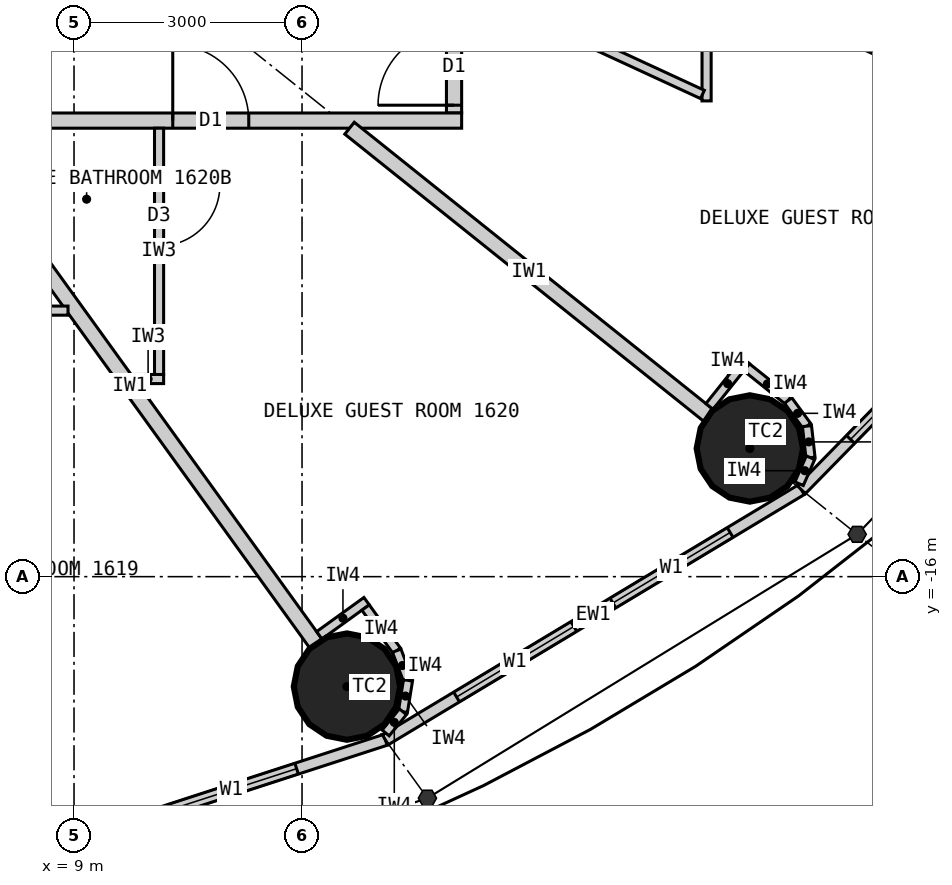
"""IFC4 building model, lengths in metres.
Left out: names, types, materials, properties, quantities, classifications, styles, units other than length and angle.
Written with IfcOpenShell. Run it as: python <this file> out.ifc"""

import sys

from ifc_helpers import new_model, si_unit, direction, frame, frame_2d, origin, origin_2d, place, context, subcontext, project, spatial, rectangle, circle, extrude, element, fill, save


model = new_model("IFC4")
c1 = context("Model", 3, precision=1e-05, world=origin(), true_north=direction((0.0, 1.0)))
c2 = subcontext(c1, "Body", "Model", "MODEL_VIEW")
j1 = project(units=[si_unit("LENGTHUNIT", "METRE"), si_unit("PLANEANGLEUNIT", "RADIAN")], contexts=[c1])
p1 = place(None, origin())
s1 = spatial("IfcSite", under=j1, at=p1, CompositionType="ELEMENT")
p2 = place(p1, origin())
s2 = spatial("IfcBuilding", under=s1, at=p2, CompositionType="ELEMENT")
p3 = place(p2, frame((0.0, 0.0, 67.2)))
s3 = spatial("IfcBuildingStorey", under=s2, at=p3, CompositionType="ELEMENT", Elevation=67.2)
for number, where, z_axis, x_axis in (
    (1, (12.591, -17.447, 0.0), (0.0, 0.0, 1.0), (1.0, 0.0, 0.0)),
    (2, (17.892, -14.313, 0.0), (0.0, 0.0, 1.0), (1.0, 0.0, 0.0)),
):
    element("IfcColumn", number, at=place(p3, frame(where, z_axis=z_axis, x_axis=x_axis)), inside=s3, PredefinedType="COLUMN", context=c2, shape_type="SweptSolid", body=[
        extrude(circle(Radius=0.7, at=origin_2d()), origin(), (0.0, 0.0, 1.0), 3.3),
    ])
p4 = place(p3, frame((6.766, -20.202, 0.0), z_axis=(0.0, 0.0, 1.0), x_axis=(0.951137534625, 0.308767534285, 0.0)))
e3 = element("IfcWall", 3, at=p4, inside=s3, PredefinedType="ELEMENTEDWALL", context=c2, shape_type="SweptSolid", body=[
    extrude(rectangle(XDim=6.655, YDim=0.15, at=frame_2d((3.328, 0.0))), origin(), (0.0, 0.0, 1.0), 3.12),
])
p5 = place(p4, frame((1.228, 0.0, 0.9)))
e4 = element("IfcOpeningElement", 4, at=p5, cuts=e3, PredefinedType="OPENING", context=c2, shape_type="SweptSolid", body=[
    extrude(rectangle(XDim=1.8, YDim=1.9, at=frame_2d((0.9, 0.95))), frame((0.0, 0.085, 0.0), z_axis=(0.0, -1.0, 0.0), x_axis=(1.0, 0.0, 0.0)), (0.0, 0.0, 1.0), 0.17),
])
p6 = place(p4, frame((3.628, 0.0, 0.9)))
e5 = element("IfcOpeningElement", 5, at=p6, cuts=e3, PredefinedType="OPENING", context=c2, shape_type="SweptSolid", body=[
    extrude(rectangle(XDim=1.8, YDim=1.9, at=frame_2d((0.9, 0.95))), frame((0.0, 0.085, 0.0), z_axis=(0.0, -1.0, 0.0), x_axis=(1.0, 0.0, 0.0)), (0.0, 0.0, 1.0), 0.17),
])
p7 = place(p3, frame((13.096, -18.147, 0.0), z_axis=(0.0, 0.0, 1.0), x_axis=(0.856983180864, 0.515344377787, 0.0)))
e6 = element("IfcWall", 6, at=p7, inside=s3, PredefinedType="ELEMENTEDWALL", context=c2, shape_type="SweptSolid", body=[
    extrude(rectangle(XDim=6.386, YDim=0.15, at=frame_2d((3.193, 0.0))), origin(), (0.0, 0.0, 1.0), 3.12),
])
p8 = place(p7, frame((1.093, 0.0, 0.9)))
e7 = element("IfcOpeningElement", 7, at=p8, cuts=e6, PredefinedType="OPENING", context=c2, shape_type="SweptSolid", body=[
    extrude(rectangle(XDim=1.8, YDim=1.9, at=frame_2d((0.9, 0.95))), frame((0.0, 0.085, 0.0), z_axis=(0.0, -1.0, 0.0), x_axis=(1.0, 0.0, 0.0)), (0.0, 0.0, 1.0), 0.17),
])
p9 = place(p7, frame((3.493, 0.0, 0.9)))
e8 = element("IfcOpeningElement", 8, at=p9, cuts=e6, PredefinedType="OPENING", context=c2, shape_type="SweptSolid", body=[
    extrude(rectangle(XDim=1.8, YDim=1.9, at=frame_2d((0.9, 0.95))), frame((0.0, 0.085, 0.0), z_axis=(0.0, -1.0, 0.0), x_axis=(1.0, 0.0, 0.0)), (0.0, 0.0, 1.0), 0.17),
])
p10 = place(p3, frame((18.57, -14.856, 0.0), z_axis=(0.0, 0.0, 1.0), x_axis=(0.699602905915, 0.714531856557, 0.0)))
e9 = element("IfcWall", 9, at=p10, inside=s3, PredefinedType="ELEMENTEDWALL", context=c2, shape_type="SweptSolid", body=[
    extrude(rectangle(XDim=6.051, YDim=0.15, at=frame_2d((3.025, 0.0))), origin(), (0.0, 0.0, 1.0), 3.12),
])
p11 = place(p10, frame((0.926, 0.0, 0.9)))
e10 = element("IfcOpeningElement", 10, at=p11, cuts=e9, PredefinedType="OPENING", context=c2, shape_type="SweptSolid", body=[
    extrude(rectangle(XDim=1.8, YDim=1.9, at=frame_2d((0.9, 0.95))), frame((0.0, 0.085, 0.0), z_axis=(0.0, -1.0, 0.0), x_axis=(1.0, 0.0, 0.0)), (0.0, 0.0, 1.0), 0.17),
])
p12 = place(p10, frame((3.325, 0.0, 0.9)))
e11 = element("IfcOpeningElement", 11, at=p12, cuts=e9, PredefinedType="OPENING", context=c2, shape_type="SweptSolid", body=[
    extrude(rectangle(XDim=1.8, YDim=1.9, at=frame_2d((0.9, 0.95))), frame((0.0, 0.085, 0.0), z_axis=(0.0, -1.0, 0.0), x_axis=(1.0, 0.0, 0.0)), (0.0, 0.0, 1.0), 0.17),
])
p13 = place(p3, frame((14.0, -9.9, 0.0), z_axis=(0.0, 0.0, 1.0), x_axis=(0.0, 1.0, 0.0)))
e12 = element("IfcWall", 12, at=p13, inside=s3, PredefinedType="PARTITIONING", context=c2, shape_type="SweptSolid", body=[
    extrude(rectangle(XDim=19.8, YDim=0.2, at=frame_2d((9.9, 0.0))), origin(), (0.0, 0.0, 1.0), 3.12),
])
p14 = place(p13, frame((0.103, 0.0, 0.0)))
e13 = element("IfcOpeningElement", 13, at=p14, cuts=e12, PredefinedType="OPENING", context=c2, shape_type="SweptSolid", body=[
    extrude(rectangle(XDim=1.0, YDim=2.2, at=frame_2d((0.5, 1.1))), frame((0.0, 0.11, 0.0), z_axis=(0.0, -1.0, 0.0), x_axis=(1.0, 0.0, 0.0)), (0.0, 0.0, 1.0), 0.22),
])
p15 = place(p13, frame((5.248, 0.0, 0.0)))
e14 = element("IfcOpeningElement", 14, at=p15, cuts=e12, PredefinedType="OPENING", context=c2, shape_type="SweptSolid", body=[
    extrude(rectangle(XDim=1.0, YDim=2.2, at=frame_2d((0.5, 1.1))), frame((0.0, 0.11, 0.0), z_axis=(0.0, -1.0, 0.0), x_axis=(1.0, 0.0, 0.0)), (0.0, 0.0, 1.0), 0.22),
])
p16 = place(p13, frame((8.438, 0.0, 0.0)))
e15 = element("IfcOpeningElement", 15, at=p16, cuts=e12, PredefinedType="OPENING", context=c2, shape_type="SweptSolid", body=[
    extrude(rectangle(XDim=1.0, YDim=2.2, at=frame_2d((0.5, 1.1))), frame((0.0, 0.11, 0.0), z_axis=(0.0, -1.0, 0.0), x_axis=(1.0, 0.0, 0.0)), (0.0, 0.0, 1.0), 0.22),
])
p17 = place(p13, frame((14.532, 0.0, 0.0)))
e16 = element("IfcOpeningElement", 16, at=p17, cuts=e12, PredefinedType="OPENING", context=c2, shape_type="SweptSolid", body=[
    extrude(rectangle(XDim=1.0, YDim=2.2, at=frame_2d((0.5, 1.1))), frame((0.0, 0.11, 0.0), z_axis=(0.0, -1.0, 0.0), x_axis=(1.0, 0.0, 0.0)), (0.0, 0.0, 1.0), 0.22),
])
p18 = place(p3, frame((14.1, -10.0, 0.0), z_axis=(0.0, 0.0, 1.0), x_axis=(-1.0, 0.0, 0.0)))
e17 = element("IfcWall", 17, at=p18, inside=s3, PredefinedType="PARTITIONING", context=c2, shape_type="SweptSolid", body=[
    extrude(rectangle(XDim=28.2, YDim=0.2, at=frame_2d((14.1, 0.0))), origin(), (0.0, 0.0, 1.0), 3.12),
])
p19 = place(p18, frame((23.865, 0.0, 0.0)))
e18 = element("IfcOpeningElement", 18, at=p19, cuts=e17, PredefinedType="OPENING", context=c2, shape_type="SweptSolid", body=[
    extrude(rectangle(XDim=1.0, YDim=2.2, at=frame_2d((0.5, 1.1))), frame((0.0, 0.11, 0.0), z_axis=(0.0, -1.0, 0.0), x_axis=(1.0, 0.0, 0.0)), (0.0, 0.0, 1.0), 0.22),
])
p20 = place(p18, frame((18.529, 0.0, 0.0)))
e19 = element("IfcOpeningElement", 19, at=p20, cuts=e17, PredefinedType="OPENING", context=c2, shape_type="SweptSolid", body=[
    extrude(rectangle(XDim=1.0, YDim=2.2, at=frame_2d((0.5, 1.1))), frame((0.0, 0.11, 0.0), z_axis=(0.0, -1.0, 0.0), x_axis=(1.0, 0.0, 0.0)), (0.0, 0.0, 1.0), 0.22),
])
p21 = place(p18, frame((14.623, 0.0, 0.0)))
e20 = element("IfcOpeningElement", 20, at=p21, cuts=e17, PredefinedType="OPENING", context=c2, shape_type="SweptSolid", body=[
    extrude(rectangle(XDim=1.0, YDim=2.2, at=frame_2d((0.5, 1.1))), frame((0.0, 0.11, 0.0), z_axis=(0.0, -1.0, 0.0), x_axis=(1.0, 0.0, 0.0)), (0.0, 0.0, 1.0), 0.22),
])
p22 = place(p18, frame((11.24, 0.0, 0.0)))
e21 = element("IfcOpeningElement", 21, at=p22, cuts=e17, PredefinedType="OPENING", context=c2, shape_type="SweptSolid", body=[
    extrude(rectangle(XDim=1.0, YDim=2.2, at=frame_2d((0.5, 1.1))), frame((0.0, 0.11, 0.0), z_axis=(0.0, -1.0, 0.0), x_axis=(1.0, 0.0, 0.0)), (0.0, 0.0, 1.0), 0.22),
])
p23 = place(p18, frame((8.671, 0.0, 0.0)))
e22 = element("IfcOpeningElement", 22, at=p23, cuts=e17, PredefinedType="OPENING", context=c2, shape_type="SweptSolid", body=[
    extrude(rectangle(XDim=1.0, YDim=2.2, at=frame_2d((0.5, 1.1))), frame((0.0, 0.11, 0.0), z_axis=(0.0, -1.0, 0.0), x_axis=(1.0, 0.0, 0.0)), (0.0, 0.0, 1.0), 0.22),
])
p24 = place(p18, frame((2.801, 0.0, 0.0)))
e23 = element("IfcOpeningElement", 23, at=p24, cuts=e17, PredefinedType="OPENING", context=c2, shape_type="SweptSolid", body=[
    extrude(rectangle(XDim=1.0, YDim=2.2, at=frame_2d((0.5, 1.1))), frame((0.0, 0.11, 0.0), z_axis=(0.0, -1.0, 0.0), x_axis=(1.0, 0.0, 0.0)), (0.0, 0.0, 1.0), 0.22),
])
p25 = place(p3, frame((7.289, -10.1, 0.0), z_axis=(0.0, 0.0, 1.0), x_axis=(0.585198353053, -0.810890182197, 0.0)))
e24 = element("IfcWall", 24, at=p25, inside=s3, PredefinedType="PARTITIONING", context=c2, shape_type="SweptSolid", body=[
    extrude(rectangle(XDim=8.36, YDim=0.2, at=frame_2d((4.18, 0.0))), origin(), (0.0, 0.0, 1.0), 2.32),
])
p26 = place(p3, frame((12.625, -10.1, 0.0), z_axis=(0.0, 0.0, 1.0), x_axis=(0.780892451574, -0.624665493744, 0.0)))
e25 = element("IfcWall", 25, at=p26, inside=s3, PredefinedType="PARTITIONING", context=c2, shape_type="SweptSolid", body=[
    extrude(rectangle(XDim=6.045, YDim=0.2, at=frame_2d((3.022, 0.0))), origin(), (0.0, 0.0, 1.0), 2.32),
])
p27 = place(p3, frame((14.1, -6.512, 0.0), z_axis=(0.0, 0.0, 1.0), x_axis=(0.907832871056, -0.419332181247, 0.0)))
e26 = element("IfcWall", 26, at=p27, inside=s3, PredefinedType="PARTITIONING", context=c2, shape_type="SweptSolid", body=[
    extrude(rectangle(XDim=8.023, YDim=0.2, at=frame_2d((4.011, 0.0))), origin(), (0.0, 0.0, 1.0), 2.32),
])
p28 = place(p3, frame((17.323, -8.101, 0.0), z_axis=(0.0, 0.0, 1.0), x_axis=(0.0, -1.0, 0.0)))
e27 = element("IfcWall", 27, at=p28, inside=s3, PredefinedType="PARTITIONING", context=c2, shape_type="SweptSolid", body=[
    extrude(rectangle(XDim=1.64, YDim=0.12, at=frame_2d((0.82, 0.0))), origin(), (0.0, 0.0, 1.0), 3.12),
])
p29 = place(p3, frame((14.1, -8.193, 0.0), z_axis=(0.0, 0.0, 1.0), x_axis=(0.907836493557, -0.419324338628, 0.0)))
e28 = element("IfcWall", 28, at=p29, inside=s3, PredefinedType="PARTITIONING", context=c2, shape_type="SweptSolid", body=[
    extrude(rectangle(XDim=3.49, YDim=0.12, at=frame_2d((1.745, 0.0))), origin(), (0.0, 0.0, 1.0), 3.12),
])
p30 = place(p29, frame((0.75, 0.0, 0.0)))
e29 = element("IfcOpeningElement", 29, at=p30, cuts=e28, PredefinedType="OPENING", context=c2, shape_type="SweptSolid", body=[
    extrude(rectangle(XDim=0.8, YDim=2.1, at=frame_2d((0.4, 1.05))), frame((0.0, 0.07, 0.0), z_axis=(0.0, -1.0, 0.0), x_axis=(1.0, 0.0, 0.0)), (0.0, 0.0, 1.0), 0.14),
])
p31 = place(p3, frame((8.921, -12.5, 0.0), z_axis=(0.0, 0.0, 1.0), x_axis=(-1.0, 0.0, 0.0)))
e30 = element("IfcWall", 30, at=p31, inside=s3, PredefinedType="PARTITIONING", context=c2, shape_type="SweptSolid", body=[
    extrude(rectangle(XDim=3.372, YDim=0.12, at=frame_2d((1.686, 0.0))), origin(), (0.0, 0.0, 1.0), 3.12),
])
p32 = place(p3, frame((9.771, -13.4, 0.0), z_axis=(0.0, 0.0, 1.0), x_axis=(1.0, 0.0, 0.0)))
e31 = element("IfcWall", 31, at=p32, inside=s3, PredefinedType="PARTITIONING", context=c2, shape_type="SweptSolid", body=[
    extrude(rectangle(XDim=0.408, YDim=0.12, at=frame_2d((0.204, 0.0))), origin(), (0.0, 0.0, 1.0), 3.12),
])
p33 = place(p3, frame((10.119, -10.1, 0.0), z_axis=(0.0, 0.0, 1.0), x_axis=(0.0, -1.0, 0.0)))
e32 = element("IfcWall", 32, at=p33, inside=s3, PredefinedType="PARTITIONING", context=c2, shape_type="SweptSolid", body=[
    extrude(rectangle(XDim=3.24, YDim=0.12, at=frame_2d((1.62, 0.0))), origin(), (0.0, 0.0, 1.0), 3.12),
])
p34 = place(p33, frame((0.75, 0.0, 0.0)))
e33 = element("IfcOpeningElement", 33, at=p34, cuts=e32, PredefinedType="OPENING", context=c2, shape_type="SweptSolid", body=[
    extrude(rectangle(XDim=0.8, YDim=2.1, at=frame_2d((0.4, 1.05))), frame((0.0, 0.07, 0.0), z_axis=(0.0, -1.0, 0.0), x_axis=(1.0, 0.0, 0.0)), (0.0, 0.0, 1.0), 0.14),
])
p35 = place(p3, frame((12.227, -16.772, 0.0), z_axis=(0.0, 0.0, 1.0), x_axis=(0.810821798253, 0.585293098778, 0.0)))
e34 = element("IfcWall", 34, at=p35, inside=s3, PredefinedType="PARTITIONING", context=c2, shape_type="SweptSolid", body=[
    extrude(rectangle(XDim=0.768, YDim=0.12, at=frame_2d((0.384, 0.0))), origin(), (0.0, 0.0, 1.0), 3.12),
])
p36 = place(p3, frame((12.836, -16.406, 0.0), z_axis=(0.0, 0.0, 1.0), x_axis=(0.585223113993, -0.810872312296, 0.0)))
e35 = element("IfcWall", 35, at=p36, inside=s3, PredefinedType="PARTITIONING", context=c2, shape_type="SweptSolid", body=[
    extrude(rectangle(XDim=0.7, YDim=0.12, at=frame_2d((0.35, 0.0))), origin(), (0.0, 0.0, 1.0), 3.12),
])
p37 = place(p3, frame((13.246, -16.974, 0.0), z_axis=(0.0, 0.0, 1.0), x_axis=(0.355728122235, -0.934589483705, 0.0)))
e36 = element("IfcWall", 36, at=p37, inside=s3, PredefinedType="PARTITIONING", context=c2, shape_type="SweptSolid", body=[
    extrude(rectangle(XDim=0.418, YDim=0.12, at=frame_2d((0.209, 0.0))), origin(), (0.0, 0.0, 1.0), 3.12),
])
p38 = place(p3, frame((13.394, -17.365, 0.0), z_axis=(0.0, 0.0, 1.0), x_axis=(-0.159379276926, -0.987217425943, 0.0)))
e37 = element("IfcWall", 37, at=p38, inside=s3, PredefinedType="PARTITIONING", context=c2, shape_type="SweptSolid", body=[
    extrude(rectangle(XDim=0.418, YDim=0.12, at=frame_2d((0.209, 0.0))), origin(), (0.0, 0.0, 1.0), 3.12),
])
p39 = place(p3, frame((13.328, -17.777, 0.0), z_axis=(0.0, 0.0, 1.0), x_axis=(-0.632276783541, -0.774742582407, 0.0)))
e38 = element("IfcWall", 38, at=p39, inside=s3, PredefinedType="PARTITIONING", context=c2, shape_type="SweptSolid", body=[
    extrude(rectangle(XDim=0.36, YDim=0.12, at=frame_2d((0.18, 0.0))), origin(), (0.0, 0.0, 1.0), 3.12),
])
p40 = place(p3, frame((17.361, -13.76, 0.0), z_axis=(0.0, 0.0, 1.0), x_axis=(0.624501042889, 0.781023973659, 0.0)))
e39 = element("IfcWall", 39, at=p40, inside=s3, PredefinedType="PARTITIONING", context=c2, shape_type="SweptSolid", body=[
    extrude(rectangle(XDim=0.767, YDim=0.12, at=frame_2d((0.384, 0.0))), origin(), (0.0, 0.0, 1.0), 3.12),
])
p41 = place(p3, frame((17.85, -13.246, 0.0), z_axis=(0.0, 0.0, 1.0), x_axis=(0.780902834923, -0.62465251333, 0.0)))
e40 = element("IfcWall", 40, at=p41, inside=s3, PredefinedType="PARTITIONING", context=c2, shape_type="SweptSolid", body=[
    extrude(rectangle(XDim=0.7, YDim=0.12, at=frame_2d((0.35, 0.0))), origin(), (0.0, 0.0, 1.0), 3.12),
])
for number, where, z_axis, x_axis in (
    (41, (18.396, -13.683, 0.0), (0.0, 0.0, 1.0), (0.592, -0.806, 0.0)),
    (42, (18.644, -14.02, 0.0), (0.0, 0.0, 1.0), (0.11, -0.994, 0.0)),
):
    element("IfcWall", number, at=place(p3, frame(where, z_axis=z_axis, x_axis=x_axis)), inside=s3, PredefinedType="PARTITIONING", context=c2, shape_type="SweptSolid", body=[
        extrude(rectangle(XDim=0.418, YDim=0.12, at=frame_2d((0.209, 0.0))), origin(), (0.0, 0.0, 1.0), 3.12),
    ])
p42 = place(p3, frame((18.69, -14.435, 0.0), z_axis=(0.0, 0.0, 1.0), x_axis=(-0.401093412634, -0.91603715773, 0.0)))
e43 = element("IfcWall", 43, at=p42, inside=s3, PredefinedType="PARTITIONING", context=c2, shape_type="SweptSolid", body=[
    extrude(rectangle(XDim=0.373, YDim=0.12, at=frame_2d((0.187, 0.0))), origin(), (0.0, 0.0, 1.0), 3.12),
])
p43 = place(p6, origin())
e44 = element("IfcWindow", 44, at=p43, inside=s3, PartitioningType="SINGLE_PANEL", PredefinedType="WINDOW", context=c2, shape_type="SweptSolid", body=[
    extrude(rectangle(XDim=1.8, YDim=1.9, at=frame_2d((0.9, 0.95))), frame((0.0, 0.03, 0.0), z_axis=(0.0, -1.0, 0.0), x_axis=(1.0, 0.0, 0.0)), (0.0, 0.0, 1.0), 0.06),
])
fill(e5, e44)
p44 = place(p8, origin())
e45 = element("IfcWindow", 45, at=p44, inside=s3, PartitioningType="SINGLE_PANEL", PredefinedType="WINDOW", context=c2, shape_type="SweptSolid", body=[
    extrude(rectangle(XDim=1.8, YDim=1.9, at=frame_2d((0.9, 0.95))), frame((0.0, 0.03, 0.0), z_axis=(0.0, -1.0, 0.0), x_axis=(1.0, 0.0, 0.0)), (0.0, 0.0, 1.0), 0.06),
])
fill(e7, e45)
p45 = place(p9, origin())
e46 = element("IfcWindow", 46, at=p45, inside=s3, PartitioningType="SINGLE_PANEL", PredefinedType="WINDOW", context=c2, shape_type="SweptSolid", body=[
    extrude(rectangle(XDim=1.8, YDim=1.9, at=frame_2d((0.9, 0.95))), frame((0.0, 0.03, 0.0), z_axis=(0.0, -1.0, 0.0), x_axis=(1.0, 0.0, 0.0)), (0.0, 0.0, 1.0), 0.06),
])
fill(e8, e46)
p46 = place(p11, origin())
e47 = element("IfcWindow", 47, at=p46, inside=s3, PartitioningType="SINGLE_PANEL", PredefinedType="WINDOW", context=c2, shape_type="SweptSolid", body=[
    extrude(rectangle(XDim=1.8, YDim=1.9, at=frame_2d((0.9, 0.95))), frame((0.0, 0.03, 0.0), z_axis=(0.0, -1.0, 0.0), x_axis=(1.0, 0.0, 0.0)), (0.0, 0.0, 1.0), 0.06),
])
fill(e10, e47)
p47 = place(p14, origin())
e48 = element("IfcDoor", 48, at=p47, inside=s3, OperationType="SINGLE_SWING_LEFT", PredefinedType="DOOR", context=c2, shape_type="SweptSolid", body=[
    extrude(rectangle(XDim=1.0, YDim=2.2, at=frame_2d((0.5, 1.1))), frame((0.0, 0.025, 0.0), z_axis=(0.0, -1.0, 0.0), x_axis=(1.0, 0.0, 0.0)), (0.0, 0.0, 1.0), 0.05),
])
fill(e13, e48)
p48 = place(p34, origin())
e49 = element("IfcDoor", 49, at=p48, inside=s3, OperationType="SINGLE_SWING_LEFT", PredefinedType="DOOR", context=c2, shape_type="SweptSolid", body=[
    extrude(rectangle(XDim=0.8, YDim=2.1, at=frame_2d((0.4, 1.05))), frame((0.0, 0.025, 0.0), z_axis=(0.0, -1.0, 0.0), x_axis=(1.0, 0.0, 0.0)), (0.0, 0.0, 1.0), 0.05),
])
fill(e33, e49)
p49 = place(p24, origin())
e50 = element("IfcDoor", 50, at=p49, inside=s3, OperationType="SINGLE_SWING_RIGHT", PredefinedType="DOOR", context=c2, shape_type="SweptSolid", body=[
    extrude(rectangle(XDim=1.0, YDim=2.2, at=frame_2d((0.5, 1.1))), frame((0.0, 0.025, 0.0), z_axis=(0.0, -1.0, 0.0), x_axis=(1.0, 0.0, 0.0)), (0.0, 0.0, 1.0), 0.05),
])
fill(e23, e50)
save(model, sys.argv[1])
